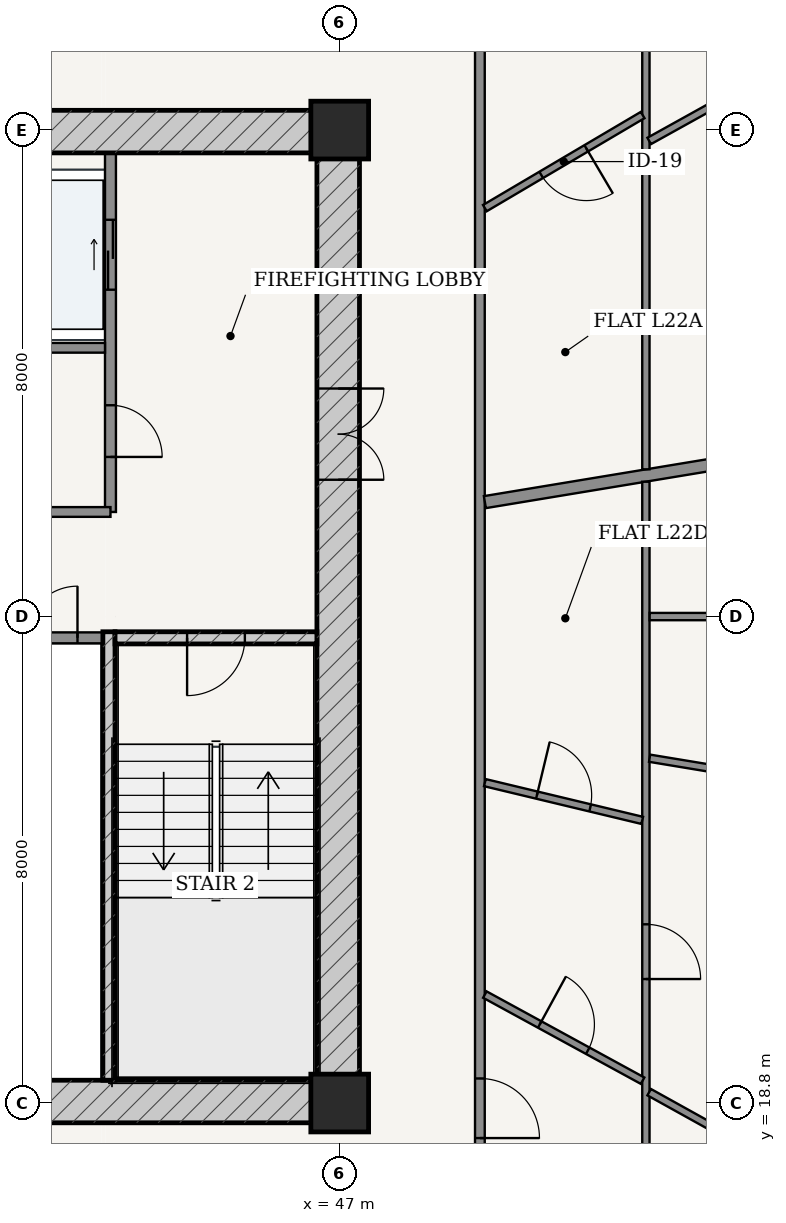
"""IFC4 building model, lengths in metres.
Left out: names, types, materials, properties, quantities, classifications, styles, units other than length and angle.
Written with IfcOpenShell. Run it as: python <this file> out.ifc"""

import sys

from ifc_helpers import new_model, si_unit, direction, frame, frame_2d, origin, origin_2d, place, context, subcontext, project, spatial, rectangle, extrude, source, transform, mapped, element, fill, save


model = new_model("IFC4")
c1 = context("Model", 3, precision=1e-05, world=origin(), true_north=direction((-0.2419218956, 0.970295726276)))
c2 = subcontext(c1, "Body", "Model", "MODEL_VIEW")
j1 = project(units=[si_unit("LENGTHUNIT", "METRE"), si_unit("PLANEANGLEUNIT", "RADIAN")], contexts=[c1])
p1 = place(None, origin())
s1 = spatial("IfcSite", under=j1, at=p1, CompositionType="ELEMENT")
p2 = place(p1, origin())
s2 = spatial("IfcBuilding", under=s1, at=p2, CompositionType="ELEMENT")
p3 = place(p2, frame((0.0, 0.0, 87.0)))
s3 = spatial("IfcBuildingStorey", under=s2, at=p3, CompositionType="ELEMENT", Elevation=87.0)
for number, where, z_axis, x_axis in (
    (1, (47.0, 18.8, 0.0), (0.0, 0.0, 1.0), (1.0, 0.0, 0.0)),
    (2, (47.0, 34.8, 0.0), (0.0, 0.0, 1.0), (1.0, 0.0, 0.0)),
):
    element("IfcColumn", number, at=place(p3, frame(where, z_axis=z_axis, x_axis=x_axis)), inside=s3, PredefinedType="COLUMN", context=c2, shape_type="SweptSolid", body=[
        extrude(rectangle(XDim=0.95, YDim=0.95, at=origin_2d()), origin(), (0.0, 0.0, 1.0), 3.6),
    ])
p4 = place(p3, frame((28.675, 18.825, 0.0), z_axis=(0.0, 0.0, 1.0), x_axis=(1.0, 0.0, 0.0)))
e3 = element("IfcWall", 3, at=p4, inside=s3, PredefinedType="SHEAR", context=c2, shape_type="SweptSolid", body=[
    extrude(rectangle(XDim=18.65, YDim=0.7, at=frame_2d((9.325, 0.0))), origin(), (0.0, 0.0, 1.0), 3.325),
])
p5 = place(p4, frame((7.577, 0.0, 0.0)))
e4 = element("IfcOpeningElement", 4, at=p5, cuts=e3, PredefinedType="OPENING", context=c2, shape_type="SweptSolid", body=[
    extrude(rectangle(XDim=0.85, YDim=2.1, at=frame_2d((0.425, 1.05))), frame((0.0, 0.36, 0.0), z_axis=(0.0, -1.0, 0.0), x_axis=(1.0, 0.0, 0.0)), (0.0, 0.0, 1.0), 0.72),
])
p6 = place(p4, frame((10.623, 0.0, 0.0)))
e5 = element("IfcOpeningElement", 5, at=p6, cuts=e3, PredefinedType="OPENING", context=c2, shape_type="SweptSolid", body=[
    extrude(rectangle(XDim=0.85, YDim=2.1, at=frame_2d((0.425, 1.05))), frame((0.0, 0.36, 0.0), z_axis=(0.0, -1.0, 0.0), x_axis=(1.0, 0.0, 0.0)), (0.0, 0.0, 1.0), 0.72),
])
p7 = place(p3, frame((28.675, 34.775, 0.0), z_axis=(0.0, 0.0, 1.0), x_axis=(1.0, 0.0, 0.0)))
e6 = element("IfcWall", 6, at=p7, inside=s3, PredefinedType="SHEAR", context=c2, shape_type="SweptSolid", body=[
    extrude(rectangle(XDim=18.65, YDim=0.7, at=frame_2d((9.325, 0.0))), origin(), (0.0, 0.0, 1.0), 3.325),
])
p8 = place(p7, frame((6.837, 0.0, 0.0)))
e7 = element("IfcOpeningElement", 7, at=p8, cuts=e6, PredefinedType="OPENING", context=c2, shape_type="SweptSolid", body=[
    extrude(rectangle(XDim=0.85, YDim=2.1, at=frame_2d((0.425, 1.05))), frame((0.0, 0.36, 0.0), z_axis=(0.0, -1.0, 0.0), x_axis=(1.0, 0.0, 0.0)), (0.0, 0.0, 1.0), 0.72),
])
p9 = place(p7, frame((8.895, 0.0, 0.0)))
e8 = element("IfcOpeningElement", 8, at=p9, cuts=e6, PredefinedType="OPENING", context=c2, shape_type="SweptSolid", body=[
    extrude(rectangle(XDim=0.86, YDim=2.1, at=frame_2d((0.43, 1.05))), frame((0.0, 0.36, 0.0), z_axis=(0.0, -1.0, 0.0), x_axis=(1.0, 0.0, 0.0)), (0.0, 0.0, 1.0), 0.72),
])
p10 = place(p7, frame((10.962, 0.0, 0.0)))
e9 = element("IfcOpeningElement", 9, at=p10, cuts=e6, PredefinedType="OPENING", context=c2, shape_type="SweptSolid", body=[
    extrude(rectangle(XDim=0.85, YDim=2.1, at=frame_2d((0.425, 1.05))), frame((0.0, 0.36, 0.0), z_axis=(0.0, -1.0, 0.0), x_axis=(1.0, 0.0, 0.0)), (0.0, 0.0, 1.0), 0.72),
])
p11 = place(p3, frame((46.975, 19.175, 0.0), z_axis=(0.0, 0.0, 1.0), x_axis=(0.0, 1.0, 0.0)))
e10 = element("IfcWall", 10, at=p11, inside=s3, PredefinedType="SHEAR", context=c2, shape_type="SweptSolid", body=[
    extrude(rectangle(XDim=15.25, YDim=0.7, at=frame_2d((7.625, 0.0))), origin(), (0.0, 0.0, 1.0), 3.325),
])
p12 = place(p11, frame((9.875, 0.0, 0.0)))
e11 = element("IfcOpeningElement", 11, at=p12, cuts=e10, PredefinedType="OPENING", context=c2, shape_type="SweptSolid", body=[
    extrude(rectangle(XDim=1.5, YDim=2.2, at=frame_2d((0.75, 1.1))), frame((0.0, 0.36, 0.0), z_axis=(0.0, -1.0, 0.0), x_axis=(1.0, 0.0, 0.0)), (0.0, 0.0, 1.0), 0.72),
])
p13 = place(p3, frame((43.205, 19.175, 0.0), z_axis=(0.0, 0.0, 1.0), x_axis=(0.0, 1.0, 0.0)))
e12 = element("IfcWall", 12, at=p13, inside=s3, PredefinedType="SOLIDWALL", context=c2, shape_type="SweptSolid", body=[
    extrude(rectangle(XDim=7.375, YDim=0.2, at=frame_2d((3.688, 0.0))), origin(), (0.0, 0.0, 1.0), 3.325),
])
p14 = place(p3, frame((43.305, 26.45, 0.0), z_axis=(0.0, 0.0, 1.0), x_axis=(1.0, 0.0, 0.0)))
e13 = element("IfcWall", 13, at=p14, inside=s3, PredefinedType="SOLIDWALL", context=c2, shape_type="SweptSolid", body=[
    extrude(rectangle(XDim=3.32, YDim=0.2, at=frame_2d((1.66, 0.0))), origin(), (0.0, 0.0, 1.0), 3.325),
])
p15 = place(p14, frame((1.185, 0.0, 0.0)))
e14 = element("IfcOpeningElement", 14, at=p15, cuts=e13, PredefinedType="OPENING", context=c2, shape_type="SweptSolid", body=[
    extrude(rectangle(XDim=0.95, YDim=2.15, at=frame_2d((0.475, 1.075))), frame((0.0, 0.11, 0.0), z_axis=(0.0, -1.0, 0.0), x_axis=(1.0, 0.0, 0.0)), (0.0, 0.0, 1.0), 0.22),
])
p16 = place(p3, frame((41.425, 26.45, 0.0), z_axis=(0.0, 0.0, 1.0), x_axis=(1.0, 0.0, 0.0)))
e15 = element("IfcWall", 15, at=p16, inside=s3, PredefinedType="PARTITIONING", context=c2, shape_type="SweptSolid", body=[
    extrude(rectangle(XDim=1.675, YDim=0.18, at=frame_2d((0.837, 0.0))), origin(), (0.0, 0.0, 1.0), 3.325),
])
p17 = place(p16, frame((0.413, 0.0, 0.0)))
e16 = element("IfcOpeningElement", 16, at=p17, cuts=e15, PredefinedType="OPENING", context=c2, shape_type="SweptSolid", body=[
    extrude(rectangle(XDim=0.85, YDim=2.1, at=frame_2d((0.425, 1.05))), frame((0.0, 0.1, 0.0), z_axis=(0.0, -1.0, 0.0), x_axis=(1.0, 0.0, 0.0)), (0.0, 0.0, 1.0), 0.2),
])
p18 = place(p3, frame((43.23, 28.52, 0.0), z_axis=(0.0, 0.0, 1.0), x_axis=(0.0, 1.0, 0.0)))
e17 = element("IfcWall", 17, at=p18, inside=s3, PredefinedType="PARTITIONING", context=c2, shape_type="SweptSolid", body=[
    extrude(rectangle(XDim=5.905, YDim=0.18, at=frame_2d((2.953, 0.0))), origin(), (0.0, 0.0, 1.0), 3.325),
])
p19 = place(p18, frame((0.905, 0.0, 0.0)))
e18 = element("IfcOpeningElement", 18, at=p19, cuts=e17, PredefinedType="OPENING", context=c2, shape_type="SweptSolid", body=[
    extrude(rectangle(XDim=0.85, YDim=2.1, at=frame_2d((0.425, 1.05))), frame((0.0, 0.1, 0.0), z_axis=(0.0, -1.0, 0.0), x_axis=(1.0, 0.0, 0.0)), (0.0, 0.0, 1.0), 0.2),
])
p20 = place(p18, frame((3.655, 0.0, 0.0)))
e19 = element("IfcOpeningElement", 19, at=p20, cuts=e17, PredefinedType="OPENING", context=c2, shape_type="SweptSolid", body=[
    extrude(rectangle(XDim=1.15, YDim=2.2, at=frame_2d((0.575, 1.1))), frame((0.0, 0.1, 0.0), z_axis=(0.0, -1.0, 0.0), x_axis=(1.0, 0.0, 0.0)), (0.0, 0.0, 1.0), 0.2),
])
p21 = place(p3, frame((41.425, 31.22, 0.0), z_axis=(0.0, 0.0, 1.0), x_axis=(1.0, 0.0, 0.0)))
e20 = element("IfcWall", 20, at=p21, inside=s3, PredefinedType="PARTITIONING", context=c2, shape_type="SweptSolid", body=[
    extrude(rectangle(XDim=1.715, YDim=0.16, at=frame_2d((0.857, 0.0))), origin(), (0.0, 0.0, 1.0), 3.325),
])
p22 = place(p3, frame((41.425, 28.52, 0.0), z_axis=(0.0, 0.0, 1.0), x_axis=(1.0, 0.0, 0.0)))
e21 = element("IfcWall", 21, at=p22, inside=s3, PredefinedType="PARTITIONING", context=c2, shape_type="SweptSolid", body=[
    extrude(rectangle(XDim=1.805, YDim=0.16, at=frame_2d((0.902, 0.0))), origin(), (0.0, 0.0, 1.0), 3.325),
])
p23 = place(p3, frame((49.305, 16.575, 0.0), z_axis=(0.0, 0.0, 1.0), x_axis=(0.0, 1.0, 0.0)))
e22 = element("IfcWall", 22, at=p23, inside=s3, PredefinedType="PARTITIONING", context=c2, shape_type="SweptSolid", body=[
    extrude(rectangle(XDim=20.45, YDim=0.16, at=frame_2d((10.225, 0.0))), origin(), (0.0, 0.0, 1.0), 2.767),
])
p24 = place(p23, frame((1.649, 0.0, 0.0)))
e23 = element("IfcOpeningElement", 23, at=p24, cuts=e22, PredefinedType="OPENING", context=c2, shape_type="SweptSolid", body=[
    extrude(rectangle(XDim=0.98, YDim=2.2, at=frame_2d((0.49, 1.1))), frame((0.0, 0.09, 0.0), z_axis=(0.0, -1.0, 0.0), x_axis=(1.0, 0.0, 0.0)), (0.0, 0.0, 1.0), 0.18),
])
p25 = place(p3, frame((49.387, 28.682, 0.0), z_axis=(0.0, 0.0, 1.0), x_axis=(0.986617934215, 0.163049231479, 0.0)))
e24 = element("IfcWall", 24, at=p25, inside=s3, PredefinedType="PARTITIONING", context=c2, shape_type="SweptSolid", body=[
    extrude(rectangle(XDim=14.785, YDim=0.2, at=frame_2d((7.392, 0.0))), origin(), (0.0, 0.0, 1.0), 2.767),
])
p26 = place(p3, frame((52.035, 39.835, 0.0), z_axis=(0.0, 0.0, 1.0), x_axis=(0.0, -1.0, 0.0)))
e25 = element("IfcWall", 25, at=p26, inside=s3, PredefinedType="PARTITIONING", context=c2, shape_type="SweptSolid", body=[
    extrude(rectangle(XDim=10.614, YDim=0.12, at=frame_2d((5.307, 0.0))), origin(), (0.0, 0.0, 1.0), 2.767),
])
p27 = place(p26, frame((2.107, 0.0, 0.0)))
e26 = element("IfcOpeningElement", 26, at=p27, cuts=e25, PredefinedType="OPENING", context=c2, shape_type="SweptSolid", body=[
    extrude(rectangle(XDim=0.9, YDim=2.15, at=frame_2d((0.45, 1.075))), frame((0.0, 0.07, 0.0), z_axis=(0.0, -1.0, 0.0), x_axis=(1.0, 0.0, 0.0)), (0.0, 0.0, 1.0), 0.14),
])
p28 = place(p3, frame((52.089, 34.622, 0.0), z_axis=(0.0, 0.0, 1.0), x_axis=(0.874324904351, 0.485341077626, 0.0)))
e27 = element("IfcWall", 27, at=p28, inside=s3, PredefinedType="PARTITIONING", context=c2, shape_type="SweptSolid", body=[
    extrude(rectangle(XDim=9.066, YDim=0.12, at=frame_2d((4.533, 0.0))), origin(), (0.0, 0.0, 1.0), 2.767),
])
p29 = place(p28, frame((3.016, 0.0, 0.0)))
e28 = element("IfcOpeningElement", 28, at=p29, cuts=e27, PredefinedType="OPENING", context=c2, shape_type="SweptSolid", body=[
    extrude(rectangle(XDim=0.9, YDim=2.15, at=frame_2d((0.45, 1.075))), frame((0.0, 0.07, 0.0), z_axis=(0.0, -1.0, 0.0), x_axis=(1.0, 0.0, 0.0)), (0.0, 0.0, 1.0), 0.14),
])
p30 = place(p3, frame((49.387, 33.517, 0.0), z_axis=(0.0, 0.0, 1.0), x_axis=(0.861344081849, 0.508022019862, 0.0)))
e29 = element("IfcWall", 29, at=p30, inside=s3, PredefinedType="PARTITIONING", context=c2, shape_type="SweptSolid", body=[
    extrude(rectangle(XDim=3.013, YDim=0.12, at=frame_2d((1.506, 0.0))), origin(), (0.0, 0.0, 1.0), 3.325),
])
p31 = place(p30, frame((1.076, 0.0, 0.0)))
e30 = element("IfcOpeningElement", 30, at=p31, cuts=e29, PredefinedType="OPENING", context=c2, shape_type="SweptSolid", body=[
    extrude(rectangle(XDim=0.86, YDim=2.15, at=frame_2d((0.43, 1.075))), frame((0.0, 0.07, 0.0), z_axis=(0.0, -1.0, 0.0), x_axis=(1.0, 0.0, 0.0)), (0.0, 0.0, 1.0), 0.14),
])
p32 = place(p3, frame((52.035, 29.017, 0.0), z_axis=(0.0, 0.0, 1.0), x_axis=(0.0, -1.0, 0.0)))
e31 = element("IfcWall", 31, at=p32, inside=s3, PredefinedType="PARTITIONING", context=c2, shape_type="SweptSolid", body=[
    extrude(rectangle(XDim=15.252, YDim=0.12, at=frame_2d((7.626, 0.0))), origin(), (0.0, 0.0, 1.0), 2.767),
])
p33 = place(p32, frame((7.278, 0.0, 0.0)))
e32 = element("IfcOpeningElement", 32, at=p33, cuts=e31, PredefinedType="OPENING", context=c2, shape_type="SweptSolid", body=[
    extrude(rectangle(XDim=0.9, YDim=2.15, at=frame_2d((0.45, 1.075))), frame((0.0, 0.07, 0.0), z_axis=(0.0, -1.0, 0.0), x_axis=(1.0, 0.0, 0.0)), (0.0, 0.0, 1.0), 0.14),
])
p34 = place(p3, frame((52.089, 18.979, 0.0), z_axis=(0.0, 0.0, 1.0), x_axis=(0.874313476423, -0.485361664066, 0.0)))
e33 = element("IfcWall", 33, at=p34, inside=s3, PredefinedType="PARTITIONING", context=c2, shape_type="SweptSolid", body=[
    extrude(rectangle(XDim=9.066, YDim=0.12, at=frame_2d((4.533, 0.0))), origin(), (0.0, 0.0, 1.0), 2.767),
])
p35 = place(p34, frame((3.02, 0.0, 0.0)))
e34 = element("IfcOpeningElement", 34, at=p35, cuts=e33, PredefinedType="OPENING", context=c2, shape_type="SweptSolid", body=[
    extrude(rectangle(XDim=0.9, YDim=2.15, at=frame_2d((0.45, 1.075))), frame((0.0, 0.07, 0.0), z_axis=(0.0, -1.0, 0.0), x_axis=(1.0, 0.0, 0.0)), (0.0, 0.0, 1.0), 0.14),
])
p36 = place(p3, frame((52.096, 24.47, 0.0), z_axis=(0.0, 0.0, 1.0), x_axis=(0.986618264768, -0.163047231274, 0.0)))
e35 = element("IfcWall", 35, at=p36, inside=s3, PredefinedType="PARTITIONING", context=c2, shape_type="SweptSolid", body=[
    extrude(rectangle(XDim=12.039, YDim=0.12, at=frame_2d((6.02, 0.0))), origin(), (0.0, 0.0, 1.0), 2.767),
])
p37 = place(p36, frame((4.496, 0.0, 0.0)))
e36 = element("IfcOpeningElement", 36, at=p37, cuts=e35, PredefinedType="OPENING", context=c2, shape_type="SweptSolid", body=[
    extrude(rectangle(XDim=0.9, YDim=2.15, at=frame_2d((0.45, 1.075))), frame((0.0, 0.07, 0.0), z_axis=(0.0, -1.0, 0.0), x_axis=(1.0, 0.0, 0.0)), (0.0, 0.0, 1.0), 0.14),
])
p38 = place(p3, frame((52.097, 26.8, 0.0), z_axis=(0.0, 0.0, 1.0), x_axis=(1.0, 0.0, 0.0)))
e37 = element("IfcWall", 37, at=p38, inside=s3, PredefinedType="PARTITIONING", context=c2, shape_type="SweptSolid", body=[
    extrude(rectangle(XDim=12.443, YDim=0.12, at=frame_2d((6.222, 0.0))), origin(), (0.0, 0.0, 1.0), 2.767),
])
p39 = place(p38, frame((5.771, 0.0, 0.0)))
e38 = element("IfcOpeningElement", 38, at=p39, cuts=e37, PredefinedType="OPENING", context=c2, shape_type="SweptSolid", body=[
    extrude(rectangle(XDim=0.9, YDim=2.15, at=frame_2d((0.45, 1.075))), frame((0.0, 0.07, 0.0), z_axis=(0.0, -1.0, 0.0), x_axis=(1.0, 0.0, 0.0)), (0.0, 0.0, 1.0), 0.14),
])
p40 = place(p3, frame((49.387, 20.583, 0.0), z_axis=(0.0, 0.0, 1.0), x_axis=(0.877718703033, -0.479176249773, 0.0)))
e39 = element("IfcWall", 39, at=p40, inside=s3, PredefinedType="PARTITIONING", context=c2, shape_type="SweptSolid", body=[
    extrude(rectangle(XDim=2.955, YDim=0.12, at=frame_2d((1.478, 0.0))), origin(), (0.0, 0.0, 1.0), 2.767),
])
p41 = place(p40, frame((1.028, 0.0, 0.0)))
e40 = element("IfcOpeningElement", 40, at=p41, cuts=e39, PredefinedType="OPENING", context=c2, shape_type="SweptSolid", body=[
    extrude(rectangle(XDim=0.9, YDim=2.15, at=frame_2d((0.45, 1.075))), frame((0.0, 0.07, 0.0), z_axis=(0.0, -1.0, 0.0), x_axis=(1.0, 0.0, 0.0)), (0.0, 0.0, 1.0), 0.14),
])
p42 = place(p3, frame((49.387, 24.069, 0.0), z_axis=(0.0, 0.0, 1.0), x_axis=(0.972423933179, -0.233220269661, 0.0)))
e41 = element("IfcWall", 41, at=p42, inside=s3, PredefinedType="PARTITIONING", context=c2, shape_type="SweptSolid", body=[
    extrude(rectangle(XDim=2.661, YDim=0.12, at=frame_2d((1.331, 0.0))), origin(), (0.0, 0.0, 1.0), 3.325),
])
p43 = place(p42, frame((0.881, 0.0, 0.0)))
e42 = element("IfcOpeningElement", 42, at=p43, cuts=e41, PredefinedType="OPENING", context=c2, shape_type="SweptSolid", body=[
    extrude(rectangle(XDim=0.9, YDim=2.15, at=frame_2d((0.45, 1.075))), frame((0.0, 0.07, 0.0), z_axis=(0.0, -1.0, 0.0), x_axis=(1.0, 0.0, 0.0)), (0.0, 0.0, 1.0), 0.14),
])
m1 = source(origin(), c2, "Body", "SweptSolid", [
    extrude(rectangle(XDim=1.5, YDim=2.2, at=frame_2d((0.75, 1.1))), frame((0.0, 0.025, 0.0), z_axis=(0.0, -1.0, 0.0), x_axis=(1.0, 0.0, 0.0)), (0.0, 0.0, 1.0), 0.05),
])
p44 = place(p12, frame((1.5, 0.0, 0.0), z_axis=(0.0, 0.0, 1.0), x_axis=(-1.0, 0.0, 0.0)))
e43 = element("IfcDoor", 43, at=p44, inside=s3, OperationType="DOUBLE_DOOR_SINGLE_SWING", PredefinedType="DOOR", context=c2, shape_type="MappedRepresentation", body=[
    mapped(m1, transform((0.0, 0.0, 0.0), scale=1.0)),
])
fill(e11, e43)
m2 = source(origin(), c2, "Body", "SweptSolid", [
    extrude(rectangle(XDim=0.95, YDim=2.15, at=frame_2d((0.475, 1.075))), frame((0.0, 0.025, 0.0), z_axis=(0.0, -1.0, 0.0), x_axis=(1.0, 0.0, 0.0)), (0.0, 0.0, 1.0), 0.05),
])
p45 = place(p15, frame((0.95, 0.0, 0.0), z_axis=(0.0, 0.0, 1.0), x_axis=(-1.0, 0.0, 0.0)))
e44 = element("IfcDoor", 44, at=p45, inside=s3, OperationType="SINGLE_SWING_RIGHT", PredefinedType="DOOR", context=c2, shape_type="MappedRepresentation", body=[
    mapped(m2, transform((0.0, 0.0, 0.0), scale=1.0)),
])
fill(e14, e44)
m3 = source(origin(), c2, "Body", "SweptSolid", [
    extrude(rectangle(XDim=0.85, YDim=2.1, at=frame_2d((0.425, 1.05))), frame((0.0, 0.025, 0.0), z_axis=(0.0, -1.0, 0.0), x_axis=(1.0, 0.0, 0.0)), (0.0, 0.0, 1.0), 0.05),
])
p46 = place(p17, origin())
e45 = element("IfcDoor", 45, at=p46, inside=s3, OperationType="SINGLE_SWING_RIGHT", PredefinedType="DOOR", context=c2, shape_type="MappedRepresentation", body=[
    mapped(m3, transform((0.0, 0.0, 0.0), scale=1.0)),
])
fill(e16, e45)
p47 = place(p19, frame((0.85, 0.0, 0.0), z_axis=(0.0, 0.0, 1.0), x_axis=(-1.0, 0.0, 0.0)))
e46 = element("IfcDoor", 46, at=p47, inside=s3, OperationType="SINGLE_SWING_RIGHT", PredefinedType="DOOR", context=c2, shape_type="MappedRepresentation", body=[
    mapped(m3, transform((0.0, 0.0, 0.0), scale=1.0)),
])
fill(e18, e46)
m4 = source(origin(), c2, "Body", "SweptSolid", [
    extrude(rectangle(XDim=1.15, YDim=2.2, at=frame_2d((0.575, 1.1))), frame((0.0, 0.025, 0.0), z_axis=(0.0, -1.0, 0.0), x_axis=(1.0, 0.0, 0.0)), (0.0, 0.0, 1.0), 0.05),
])
p48 = place(p20, origin())
e47 = element("IfcDoor", 47, at=p48, inside=s3, OperationType="DOUBLE_DOOR_SLIDING", PredefinedType="DOOR", context=c2, shape_type="MappedRepresentation", body=[
    mapped(m4, transform((0.0, 0.0, 0.0), scale=1.0)),
])
fill(e19, e47)
m5 = source(origin(), c2, "Body", "SweptSolid", [
    extrude(rectangle(XDim=0.86, YDim=2.15, at=frame_2d((0.43, 1.075))), frame((0.0, 0.025, 0.0), z_axis=(0.0, -1.0, 0.0), x_axis=(1.0, 0.0, 0.0)), (0.0, 0.0, 1.0), 0.05),
])
p49 = place(p31, frame((0.86, 0.0, 0.0), z_axis=(0.0, 0.0, 1.0), x_axis=(-1.0, 0.0, 0.0)))
e48 = element("IfcDoor", 48, at=p49, inside=s3, OperationType="SINGLE_SWING_LEFT", PredefinedType="DOOR", context=c2, shape_type="MappedRepresentation", body=[
    mapped(m5, transform((0.0, 0.0, 0.0), scale=1.0)),
])
fill(e30, e48)
m6 = source(origin(), c2, "Body", "SweptSolid", [
    extrude(rectangle(XDim=0.98, YDim=2.2, at=frame_2d((0.49, 1.1))), frame((0.0, 0.025, 0.0), z_axis=(0.0, -1.0, 0.0), x_axis=(1.0, 0.0, 0.0)), (0.0, 0.0, 1.0), 0.05),
])
p50 = place(p24, frame((0.98, 0.0, 0.0), z_axis=(0.0, 0.0, 1.0), x_axis=(-1.0, 0.0, 0.0)))
e49 = element("IfcDoor", 49, at=p50, inside=s3, OperationType="SINGLE_SWING_RIGHT", PredefinedType="DOOR", context=c2, shape_type="MappedRepresentation", body=[
    mapped(m6, transform((0.0, 0.0, 0.0), scale=1.0)),
])
fill(e23, e49)
m7 = source(origin(), c2, "Body", "SweptSolid", [
    extrude(rectangle(XDim=0.9, YDim=2.15, at=frame_2d((0.45, 1.075))), frame((0.0, 0.025, 0.0), z_axis=(0.0, -1.0, 0.0), x_axis=(1.0, 0.0, 0.0)), (0.0, 0.0, 1.0), 0.05),
])
p51 = place(p41, origin())
e50 = element("IfcDoor", 50, at=p51, inside=s3, OperationType="SINGLE_SWING_LEFT", PredefinedType="DOOR", context=c2, shape_type="MappedRepresentation", body=[
    mapped(m7, transform((0.0, 0.0, 0.0), scale=1.0)),
])
fill(e40, e50)
p52 = place(p33, origin())
e51 = element("IfcDoor", 51, at=p52, inside=s3, OperationType="SINGLE_SWING_RIGHT", PredefinedType="DOOR", context=c2, shape_type="MappedRepresentation", body=[
    mapped(m7, transform((0.0, 0.0, 0.0), scale=1.0)),
])
fill(e32, e51)
p53 = place(p43, origin())
e52 = element("IfcDoor", 52, at=p53, inside=s3, OperationType="SINGLE_SWING_LEFT", PredefinedType="DOOR", context=c2, shape_type="MappedRepresentation", body=[
    mapped(m7, transform((0.0, 0.0, 0.0), scale=1.0)),
])
fill(e42, e52)
save(model, sys.argv[1])
